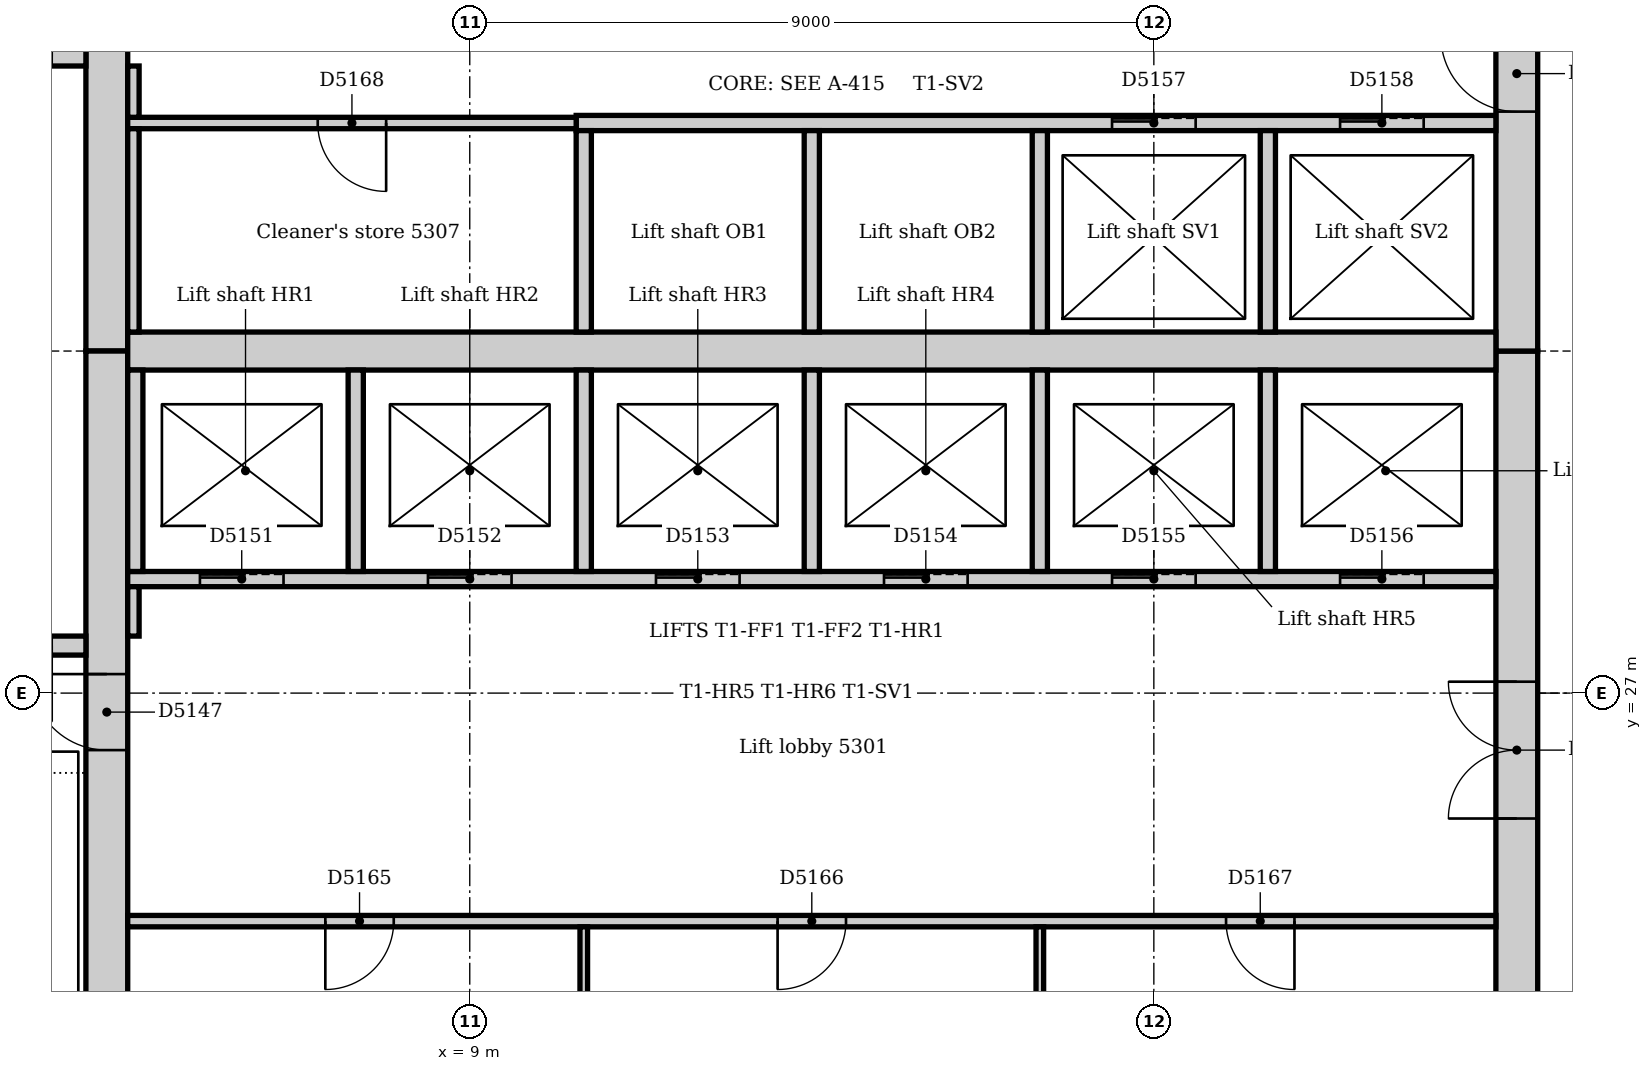
"""IFC4 building model, lengths in metres.
Left out: names, types, materials, properties, quantities, classifications, styles, units other than length and angle.
Written with IfcOpenShell. Run it as: python <this file> out.ifc"""

import sys

from ifc_helpers import new_model, si_unit, direction, frame, frame_2d, origin, place, context, subcontext, project, spatial, rectangle, extrude, element, fill, save


model = new_model("IFC4")
c1 = context("Model", 3, precision=1e-05, world=origin(), true_north=direction((0.0, 1.0)))
c2 = subcontext(c1, "Body", "Model", "MODEL_VIEW")
j1 = project(units=[si_unit("LENGTHUNIT", "METRE"), si_unit("PLANEANGLEUNIT", "RADIAN")], contexts=[c1])
p1 = place(None, origin())
s1 = spatial("IfcSite", under=j1, at=p1, CompositionType="ELEMENT")
p2 = place(p1, origin())
s2 = spatial("IfcBuilding", under=s1, at=p2, CompositionType="ELEMENT")
p3 = place(p2, frame((0.0, 0.0, 222.0)))
s3 = spatial("IfcBuildingStorey", under=s2, at=p3, CompositionType="ELEMENT", Elevation=222.0)
p4 = place(p3, frame((22.775, 21.0, 0.0), z_axis=(0.0, 0.0, 1.0), x_axis=(0.0, 1.0, 0.0)))
e1 = element("IfcWall", 1, at=p4, inside=s3, PredefinedType="SOLIDWALL", context=c2, shape_type="SweptSolid", body=[
    extrude(rectangle(XDim=10.5, YDim=0.55, at=frame_2d((5.25, 0.0))), origin(), (0.0, 0.0, 1.0), 4.0),
])
p5 = place(p4, frame((4.35, 0.0, 0.0)))
e2 = element("IfcOpeningElement", 2, at=p5, cuts=e1, PredefinedType="OPENING", context=c2, shape_type="SweptSolid", body=[
    extrude(rectangle(XDim=1.8, YDim=2.1, at=frame_2d((0.9, 1.05))), frame((0.0, 0.285, 0.0), z_axis=(0.0, -1.0, 0.0), x_axis=(1.0, 0.0, 0.0)), (0.0, 0.0, 1.0), 0.57),
])
p6 = place(p3, frame((22.775, 31.5, 0.0), z_axis=(0.0, 0.0, 1.0), x_axis=(0.0, 1.0, 0.0)))
e3 = element("IfcWall", 3, at=p6, inside=s3, PredefinedType="SOLIDWALL", context=c2, shape_type="SweptSolid", body=[
    extrude(rectangle(XDim=10.5, YDim=0.55, at=frame_2d((5.25, 0.0))), origin(), (0.0, 0.0, 1.0), 4.0),
])
p7 = place(p6, frame((3.15, 0.0, 0.0)))
e4 = element("IfcOpeningElement", 4, at=p7, cuts=e3, PredefinedType="OPENING", context=c2, shape_type="SweptSolid", body=[
    extrude(rectangle(XDim=1.0, YDim=2.1, at=frame_2d((0.5, 1.05))), frame((0.0, 0.285, 0.0), z_axis=(0.0, -1.0, 0.0), x_axis=(1.0, 0.0, 0.0)), (0.0, 0.0, 1.0), 0.57),
])
p8 = place(p6, frame((5.2, 0.0, 0.0)))
e5 = element("IfcOpeningElement", 5, at=p8, cuts=e3, PredefinedType="OPENING", context=c2, shape_type="SweptSolid", body=[
    extrude(rectangle(XDim=1.0, YDim=2.1, at=frame_2d((0.5, 1.05))), frame((0.0, 0.285, 0.0), z_axis=(0.0, -1.0, 0.0), x_axis=(1.0, 0.0, 0.0)), (0.0, 0.0, 1.0), 0.57),
])
p9 = place(p3, frame((4.225, 42.0, 0.0), z_axis=(0.0, 0.0, 1.0), x_axis=(0.0, -1.0, 0.0)))
e6 = element("IfcWall", 6, at=p9, inside=s3, PredefinedType="SOLIDWALL", context=c2, shape_type="SweptSolid", body=[
    extrude(rectangle(XDim=10.5, YDim=0.55, at=frame_2d((5.25, 0.0))), origin(), (0.0, 0.0, 1.0), 4.0),
])
p10 = place(p9, frame((5.3, 0.0, 0.0)))
e7 = element("IfcOpeningElement", 7, at=p10, cuts=e6, PredefinedType="OPENING", context=c2, shape_type="SweptSolid", body=[
    extrude(rectangle(XDim=1.0, YDim=2.1, at=frame_2d((0.5, 1.05))), frame((0.0, 0.285, 0.0), z_axis=(0.0, -1.0, 0.0), x_axis=(1.0, 0.0, 0.0)), (0.0, 0.0, 1.0), 0.57),
])
p11 = place(p3, frame((4.225, 31.5, 0.0), z_axis=(0.0, 0.0, 1.0), x_axis=(0.0, -1.0, 0.0)))
e8 = element("IfcWall", 8, at=p11, inside=s3, PredefinedType="SOLIDWALL", context=c2, shape_type="SweptSolid", body=[
    extrude(rectangle(XDim=10.5, YDim=0.55, at=frame_2d((5.25, 0.0))), origin(), (0.0, 0.0, 1.0), 4.0),
])
p12 = place(p11, frame((4.25, 0.0, 0.0)))
e9 = element("IfcOpeningElement", 9, at=p12, cuts=e8, PredefinedType="OPENING", context=c2, shape_type="SweptSolid", body=[
    extrude(rectangle(XDim=1.0, YDim=2.1, at=frame_2d((0.5, 1.05))), frame((0.0, 0.285, 0.0), z_axis=(0.0, -1.0, 0.0), x_axis=(1.0, 0.0, 0.0)), (0.0, 0.0, 1.0), 0.57),
])
p13 = place(p3, frame((4.5, 31.5, 0.0), z_axis=(0.0, 0.0, 1.0), x_axis=(1.0, 0.0, 0.0)))
e10 = element("IfcWall", 10, at=p13, inside=s3, PredefinedType="SOLIDWALL", context=c2, shape_type="SweptSolid", body=[
    extrude(rectangle(XDim=18.0, YDim=0.5, at=frame_2d((9.0, 0.0))), origin(), (0.0, 0.0, 1.0), 4.0),
])
p14 = place(p3, frame((3.95, 27.625, 0.0), z_axis=(0.0, 0.0, 1.0), x_axis=(-1.0, 0.0, 0.0)))
e11 = element("IfcWall", 11, at=p14, inside=s3, PredefinedType="SOLIDWALL", context=c2, shape_type="SweptSolid", body=[
    extrude(rectangle(XDim=3.59, YDim=0.25, at=frame_2d((1.795, 0.0))), origin(), (0.0, 0.0, 1.0), 4.0),
])
p15 = place(p14, frame((0.45, 0.0, 0.0)))
e12 = element("IfcOpeningElement", 12, at=p15, cuts=e11, PredefinedType="OPENING", context=c2, shape_type="SweptSolid", body=[
    extrude(rectangle(XDim=1.0, YDim=2.1, at=frame_2d((0.5, 1.05))), frame((0.0, 0.135, 0.0), z_axis=(0.0, -1.0, 0.0), x_axis=(1.0, 0.0, 0.0)), (0.0, 0.0, 1.0), 0.27),
])
p16 = place(p3, frame((0.36, 35.375, 0.0), z_axis=(0.0, 0.0, 1.0), x_axis=(1.0, 0.0, 0.0)))
e13 = element("IfcWall", 13, at=p16, inside=s3, PredefinedType="SOLIDWALL", context=c2, shape_type="SweptSolid", body=[
    extrude(rectangle(XDim=3.59, YDim=0.25, at=frame_2d((1.795, 0.0))), origin(), (0.0, 0.0, 1.0), 4.0),
])
p17 = place(p16, frame((2.14, 0.0, 0.0)))
e14 = element("IfcOpeningElement", 14, at=p17, cuts=e13, PredefinedType="OPENING", context=c2, shape_type="SweptSolid", body=[
    extrude(rectangle(XDim=1.0, YDim=2.1, at=frame_2d((0.5, 1.05))), frame((0.0, 0.135, 0.0), z_axis=(0.0, -1.0, 0.0), x_axis=(1.0, 0.0, 0.0)), (0.0, 0.0, 1.0), 0.27),
])
p18 = place(p3, frame((4.5, 28.5, 0.0), z_axis=(0.0, 0.0, 1.0), x_axis=(1.0, 0.0, 0.0)))
e15 = element("IfcWall", 15, at=p18, inside=s3, PredefinedType="PARTITIONING", context=c2, shape_type="SweptSolid", body=[
    extrude(rectangle(XDim=18.0, YDim=0.2, at=frame_2d((9.0, 0.0))), origin(), (0.0, 0.0, 1.0), 3.85),
])
p19 = place(p18, frame((0.95, 0.0, 0.0)))
e16 = element("IfcOpeningElement", 16, at=p19, cuts=e15, PredefinedType="OPENING", context=c2, shape_type="SweptSolid", body=[
    extrude(rectangle(XDim=1.1, YDim=2.1, at=frame_2d((0.55, 1.05))), frame((0.0, 0.11, 0.0), z_axis=(0.0, -1.0, 0.0), x_axis=(1.0, 0.0, 0.0)), (0.0, 0.0, 1.0), 0.22),
])
p20 = place(p18, frame((3.95, 0.0, 0.0)))
e17 = element("IfcOpeningElement", 17, at=p20, cuts=e15, PredefinedType="OPENING", context=c2, shape_type="SweptSolid", body=[
    extrude(rectangle(XDim=1.1, YDim=2.1, at=frame_2d((0.55, 1.05))), frame((0.0, 0.11, 0.0), z_axis=(0.0, -1.0, 0.0), x_axis=(1.0, 0.0, 0.0)), (0.0, 0.0, 1.0), 0.22),
])
p21 = place(p18, frame((6.95, 0.0, 0.0)))
e18 = element("IfcOpeningElement", 18, at=p21, cuts=e15, PredefinedType="OPENING", context=c2, shape_type="SweptSolid", body=[
    extrude(rectangle(XDim=1.1, YDim=2.1, at=frame_2d((0.55, 1.05))), frame((0.0, 0.11, 0.0), z_axis=(0.0, -1.0, 0.0), x_axis=(1.0, 0.0, 0.0)), (0.0, 0.0, 1.0), 0.22),
])
p22 = place(p18, frame((9.95, 0.0, 0.0)))
e19 = element("IfcOpeningElement", 19, at=p22, cuts=e15, PredefinedType="OPENING", context=c2, shape_type="SweptSolid", body=[
    extrude(rectangle(XDim=1.1, YDim=2.1, at=frame_2d((0.55, 1.05))), frame((0.0, 0.11, 0.0), z_axis=(0.0, -1.0, 0.0), x_axis=(1.0, 0.0, 0.0)), (0.0, 0.0, 1.0), 0.22),
])
p23 = place(p18, frame((12.95, 0.0, 0.0)))
e20 = element("IfcOpeningElement", 20, at=p23, cuts=e15, PredefinedType="OPENING", context=c2, shape_type="SweptSolid", body=[
    extrude(rectangle(XDim=1.1, YDim=2.1, at=frame_2d((0.55, 1.05))), frame((0.0, 0.11, 0.0), z_axis=(0.0, -1.0, 0.0), x_axis=(1.0, 0.0, 0.0)), (0.0, 0.0, 1.0), 0.22),
])
p24 = place(p18, frame((15.95, 0.0, 0.0)))
e21 = element("IfcOpeningElement", 21, at=p24, cuts=e15, PredefinedType="OPENING", context=c2, shape_type="SweptSolid", body=[
    extrude(rectangle(XDim=1.1, YDim=2.1, at=frame_2d((0.55, 1.05))), frame((0.0, 0.11, 0.0), z_axis=(0.0, -1.0, 0.0), x_axis=(1.0, 0.0, 0.0)), (0.0, 0.0, 1.0), 0.22),
])
p25 = place(p3, frame((10.4, 34.5, 0.0), z_axis=(0.0, 0.0, 1.0), x_axis=(1.0, 0.0, 0.0)))
e22 = element("IfcWall", 22, at=p25, inside=s3, PredefinedType="PARTITIONING", context=c2, shape_type="SweptSolid", body=[
    extrude(rectangle(XDim=12.1, YDim=0.2, at=frame_2d((6.05, 0.0))), origin(), (0.0, 0.0, 1.0), 3.85),
])
p26 = place(p25, frame((7.05, 0.0, 0.0)))
e23 = element("IfcOpeningElement", 23, at=p26, cuts=e22, PredefinedType="OPENING", context=c2, shape_type="SweptSolid", body=[
    extrude(rectangle(XDim=1.1, YDim=2.1, at=frame_2d((0.55, 1.05))), frame((0.0, 0.11, 0.0), z_axis=(0.0, -1.0, 0.0), x_axis=(1.0, 0.0, 0.0)), (0.0, 0.0, 1.0), 0.22),
])
p27 = place(p25, frame((10.05, 0.0, 0.0)))
e24 = element("IfcOpeningElement", 24, at=p27, cuts=e22, PredefinedType="OPENING", context=c2, shape_type="SweptSolid", body=[
    extrude(rectangle(XDim=1.1, YDim=2.1, at=frame_2d((0.55, 1.05))), frame((0.0, 0.11, 0.0), z_axis=(0.0, -1.0, 0.0), x_axis=(1.0, 0.0, 0.0)), (0.0, 0.0, 1.0), 0.22),
])
for number, where, z_axis, x_axis in (
    (25, (10.5, 28.6, 0.0), (0.0, 0.0, 1.0), (0.0, 1.0, 0.0)),
    (26, (10.5, 31.75, 0.0), (0.0, 0.0, 1.0), (0.0, 1.0, 0.0)),
    (27, (13.5, 28.6, 0.0), (0.0, 0.0, 1.0), (0.0, 1.0, 0.0)),
    (28, (13.5, 31.75, 0.0), (0.0, 0.0, 1.0), (0.0, 1.0, 0.0)),
    (29, (16.5, 28.6, 0.0), (0.0, 0.0, 1.0), (0.0, 1.0, 0.0)),
    (30, (16.5, 31.75, 0.0), (0.0, 0.0, 1.0), (0.0, 1.0, 0.0)),
    (31, (19.5, 28.6, 0.0), (0.0, 0.0, 1.0), (0.0, 1.0, 0.0)),
    (32, (19.5, 31.75, 0.0), (0.0, 0.0, 1.0), (0.0, 1.0, 0.0)),
    (33, (4.6, 28.6, 0.0), (0.0, 0.0, 1.0), (0.0, 1.0, 0.0)),
    (34, (7.5, 28.6, 0.0), (0.0, 0.0, 1.0), (0.0, 1.0, 0.0)),
):
    element("IfcWall", number, at=place(p3, frame(where, z_axis=z_axis, x_axis=x_axis)), inside=s3, PredefinedType="PARTITIONING", context=c2, shape_type="SweptSolid", body=[
        extrude(rectangle(XDim=2.65, YDim=0.2, at=frame_2d((1.325, 0.0))), origin(), (0.0, 0.0, 1.0), 3.85),
    ])
p28 = place(p3, frame((4.5, 24.0, 0.0), z_axis=(0.0, 0.0, 1.0), x_axis=(1.0, 0.0, 0.0)))
e35 = element("IfcWall", 35, at=p28, inside=s3, PredefinedType="PARTITIONING", context=c2, shape_type="SweptSolid", body=[
    extrude(rectangle(XDim=18.0, YDim=0.15, at=frame_2d((9.0, 0.0))), origin(), (0.0, 0.0, 1.0), 3.85),
])
p29 = place(p28, frame((2.6, 0.0, 0.0)))
e36 = element("IfcOpeningElement", 36, at=p29, cuts=e35, PredefinedType="OPENING", context=c2, shape_type="SweptSolid", body=[
    extrude(rectangle(XDim=0.9, YDim=2.1, at=frame_2d((0.45, 1.05))), frame((0.0, 0.085, 0.0), z_axis=(0.0, -1.0, 0.0), x_axis=(1.0, 0.0, 0.0)), (0.0, 0.0, 1.0), 0.17),
])
p30 = place(p28, frame((8.55, 0.0, 0.0)))
e37 = element("IfcOpeningElement", 37, at=p30, cuts=e35, PredefinedType="OPENING", context=c2, shape_type="SweptSolid", body=[
    extrude(rectangle(XDim=0.9, YDim=2.1, at=frame_2d((0.45, 1.05))), frame((0.0, 0.085, 0.0), z_axis=(0.0, -1.0, 0.0), x_axis=(1.0, 0.0, 0.0)), (0.0, 0.0, 1.0), 0.17),
])
p31 = place(p28, frame((14.45, 0.0, 0.0)))
e38 = element("IfcOpeningElement", 38, at=p31, cuts=e35, PredefinedType="OPENING", context=c2, shape_type="SweptSolid", body=[
    extrude(rectangle(XDim=0.9, YDim=2.1, at=frame_2d((0.45, 1.05))), frame((0.0, 0.085, 0.0), z_axis=(0.0, -1.0, 0.0), x_axis=(1.0, 0.0, 0.0)), (0.0, 0.0, 1.0), 0.17),
])
p32 = place(p3, frame((4.5, 34.5, 0.0), z_axis=(0.0, 0.0, 1.0), x_axis=(1.0, 0.0, 0.0)))
e39 = element("IfcWall", 39, at=p32, inside=s3, PredefinedType="PARTITIONING", context=c2, shape_type="SweptSolid", body=[
    extrude(rectangle(XDim=5.9, YDim=0.15, at=frame_2d((2.95, 0.0))), origin(), (0.0, 0.0, 1.0), 3.85),
])
p33 = place(p32, frame((2.5, 0.0, 0.0)))
e40 = element("IfcOpeningElement", 40, at=p33, cuts=e39, PredefinedType="OPENING", context=c2, shape_type="SweptSolid", body=[
    extrude(rectangle(XDim=0.9, YDim=2.1, at=frame_2d((0.45, 1.05))), frame((0.0, 0.085, 0.0), z_axis=(0.0, -1.0, 0.0), x_axis=(1.0, 0.0, 0.0)), (0.0, 0.0, 1.0), 0.17),
])
p34 = place(p3, frame((4.575, 34.575, 0.0), z_axis=(0.0, 0.0, 1.0), x_axis=(0.0, 1.0, 0.0)))
e41 = element("IfcWall", 41, at=p34, inside=s3, PredefinedType="PARTITIONING", context=c2, shape_type="SweptSolid", body=[
    extrude(rectangle(XDim=0.675, YDim=0.15, at=frame_2d((0.338, 0.0))), origin(), (0.0, 0.0, 1.0), 3.85),
])
p35 = place(p3, frame((4.575, 31.75, 0.0), z_axis=(0.0, 0.0, 1.0), x_axis=(0.0, 1.0, 0.0)))
e42 = element("IfcWall", 42, at=p35, inside=s3, PredefinedType="PARTITIONING", context=c2, shape_type="SweptSolid", body=[
    extrude(rectangle(XDim=2.675, YDim=0.15, at=frame_2d((1.337, 0.0))), origin(), (0.0, 0.0, 1.0), 3.85),
])
p36 = place(p3, frame((4.575, 27.75, 0.0), z_axis=(0.0, 0.0, 1.0), x_axis=(0.0, 1.0, 0.0)))
e43 = element("IfcWall", 43, at=p36, inside=s3, PredefinedType="PARTITIONING", context=c2, shape_type="SweptSolid", body=[
    extrude(rectangle(XDim=0.65, YDim=0.15, at=frame_2d((0.325, 0.0))), origin(), (0.0, 0.0, 1.0), 3.85),
])
for number, where, z_axis, x_axis in (
    (44, (10.5, 21.0, 0.0), (0.0, 0.0, 1.0), (0.0, 1.0, 0.0)),
    (45, (16.5, 21.0, 0.0), (0.0, 0.0, 1.0), (0.0, 1.0, 0.0)),
):
    element("IfcWall", number, at=place(p3, frame(where, z_axis=z_axis, x_axis=x_axis)), inside=s3, PredefinedType="PARTITIONING", context=c2, shape_type="SweptSolid", body=[
        extrude(rectangle(XDim=2.925, YDim=0.1, at=frame_2d((1.462, 0.0))), origin(), (0.0, 0.0, 1.0), 3.85),
    ])
p37 = place(p12, frame((1.0, 0.0, 0.0), z_axis=(0.0, 0.0, 1.0), x_axis=(-1.0, 0.0, 0.0)))
e46 = element("IfcDoor", 46, at=p37, inside=s3, OperationType="SINGLE_SWING_RIGHT", PredefinedType="DOOR", context=c2, shape_type="SweptSolid", body=[
    extrude(rectangle(XDim=1.0, YDim=2.1, at=frame_2d((0.5, 1.05))), frame((0.0, 0.025, 0.0), z_axis=(0.0, -1.0, 0.0), x_axis=(1.0, 0.0, 0.0)), (0.0, 0.0, 1.0), 0.05),
])
fill(e9, e46)
p38 = place(p19, origin())
e47 = element("IfcDoor", 47, at=p38, inside=s3, OperationType="SLIDING_TO_LEFT", PredefinedType="DOOR", context=c2, shape_type="SweptSolid", body=[
    extrude(rectangle(XDim=1.1, YDim=2.1, at=frame_2d((0.55, 1.05))), frame((0.0, 0.025, 0.0), z_axis=(0.0, -1.0, 0.0), x_axis=(1.0, 0.0, 0.0)), (0.0, 0.0, 1.0), 0.05),
])
fill(e16, e47)
p39 = place(p20, origin())
e48 = element("IfcDoor", 48, at=p39, inside=s3, OperationType="SLIDING_TO_LEFT", PredefinedType="DOOR", context=c2, shape_type="SweptSolid", body=[
    extrude(rectangle(XDim=1.1, YDim=2.1, at=frame_2d((0.55, 1.05))), frame((0.0, 0.025, 0.0), z_axis=(0.0, -1.0, 0.0), x_axis=(1.0, 0.0, 0.0)), (0.0, 0.0, 1.0), 0.05),
])
fill(e17, e48)
p40 = place(p21, origin())
e49 = element("IfcDoor", 49, at=p40, inside=s3, OperationType="SLIDING_TO_LEFT", PredefinedType="DOOR", context=c2, shape_type="SweptSolid", body=[
    extrude(rectangle(XDim=1.1, YDim=2.1, at=frame_2d((0.55, 1.05))), frame((0.0, 0.025, 0.0), z_axis=(0.0, -1.0, 0.0), x_axis=(1.0, 0.0, 0.0)), (0.0, 0.0, 1.0), 0.05),
])
fill(e18, e49)
p41 = place(p22, origin())
e50 = element("IfcDoor", 50, at=p41, inside=s3, OperationType="SLIDING_TO_LEFT", PredefinedType="DOOR", context=c2, shape_type="SweptSolid", body=[
    extrude(rectangle(XDim=1.1, YDim=2.1, at=frame_2d((0.55, 1.05))), frame((0.0, 0.025, 0.0), z_axis=(0.0, -1.0, 0.0), x_axis=(1.0, 0.0, 0.0)), (0.0, 0.0, 1.0), 0.05),
])
fill(e19, e50)
p42 = place(p23, origin())
e51 = element("IfcDoor", 51, at=p42, inside=s3, OperationType="SLIDING_TO_LEFT", PredefinedType="DOOR", context=c2, shape_type="SweptSolid", body=[
    extrude(rectangle(XDim=1.1, YDim=2.1, at=frame_2d((0.55, 1.05))), frame((0.0, 0.025, 0.0), z_axis=(0.0, -1.0, 0.0), x_axis=(1.0, 0.0, 0.0)), (0.0, 0.0, 1.0), 0.05),
])
fill(e20, e51)
p43 = place(p24, origin())
e52 = element("IfcDoor", 52, at=p43, inside=s3, OperationType="SLIDING_TO_LEFT", PredefinedType="DOOR", context=c2, shape_type="SweptSolid", body=[
    extrude(rectangle(XDim=1.1, YDim=2.1, at=frame_2d((0.55, 1.05))), frame((0.0, 0.025, 0.0), z_axis=(0.0, -1.0, 0.0), x_axis=(1.0, 0.0, 0.0)), (0.0, 0.0, 1.0), 0.05),
])
fill(e21, e52)
p44 = place(p26, origin())
e53 = element("IfcDoor", 53, at=p44, inside=s3, OperationType="SLIDING_TO_LEFT", PredefinedType="DOOR", context=c2, shape_type="SweptSolid", body=[
    extrude(rectangle(XDim=1.1, YDim=2.1, at=frame_2d((0.55, 1.05))), frame((0.0, 0.025, 0.0), z_axis=(0.0, -1.0, 0.0), x_axis=(1.0, 0.0, 0.0)), (0.0, 0.0, 1.0), 0.05),
])
fill(e23, e53)
p45 = place(p27, origin())
e54 = element("IfcDoor", 54, at=p45, inside=s3, OperationType="SLIDING_TO_LEFT", PredefinedType="DOOR", context=c2, shape_type="SweptSolid", body=[
    extrude(rectangle(XDim=1.1, YDim=2.1, at=frame_2d((0.55, 1.05))), frame((0.0, 0.025, 0.0), z_axis=(0.0, -1.0, 0.0), x_axis=(1.0, 0.0, 0.0)), (0.0, 0.0, 1.0), 0.05),
])
fill(e24, e54)
p46 = place(p5, origin())
e55 = element("IfcDoor", 55, at=p46, inside=s3, OperationType="DOUBLE_DOOR_DOUBLE_SWING", PredefinedType="DOOR", context=c2, shape_type="SweptSolid", body=[
    extrude(rectangle(XDim=1.8, YDim=2.1, at=frame_2d((0.9, 1.05))), frame((0.0, 0.025, 0.0), z_axis=(0.0, -1.0, 0.0), x_axis=(1.0, 0.0, 0.0)), (0.0, 0.0, 1.0), 0.05),
])
fill(e2, e55)
p47 = place(p7, origin())
e56 = element("IfcDoor", 56, at=p47, inside=s3, OperationType="SINGLE_SWING_RIGHT", PredefinedType="DOOR", context=c2, shape_type="SweptSolid", body=[
    extrude(rectangle(XDim=1.0, YDim=2.1, at=frame_2d((0.5, 1.05))), frame((0.0, 0.025, 0.0), z_axis=(0.0, -1.0, 0.0), x_axis=(1.0, 0.0, 0.0)), (0.0, 0.0, 1.0), 0.05),
])
fill(e4, e56)
p48 = place(p29, frame((0.9, 0.0, 0.0), z_axis=(0.0, 0.0, 1.0), x_axis=(-1.0, 0.0, 0.0)))
e57 = element("IfcDoor", 57, at=p48, inside=s3, OperationType="SINGLE_SWING_RIGHT", PredefinedType="DOOR", context=c2, shape_type="SweptSolid", body=[
    extrude(rectangle(XDim=0.9, YDim=2.1, at=frame_2d((0.45, 1.05))), frame((0.0, 0.025, 0.0), z_axis=(0.0, -1.0, 0.0), x_axis=(1.0, 0.0, 0.0)), (0.0, 0.0, 1.0), 0.05),
])
fill(e36, e57)
p49 = place(p30, frame((0.9, 0.0, 0.0), z_axis=(0.0, 0.0, 1.0), x_axis=(-1.0, 0.0, 0.0)))
e58 = element("IfcDoor", 58, at=p49, inside=s3, OperationType="SINGLE_SWING_RIGHT", PredefinedType="DOOR", context=c2, shape_type="SweptSolid", body=[
    extrude(rectangle(XDim=0.9, YDim=2.1, at=frame_2d((0.45, 1.05))), frame((0.0, 0.025, 0.0), z_axis=(0.0, -1.0, 0.0), x_axis=(1.0, 0.0, 0.0)), (0.0, 0.0, 1.0), 0.05),
])
fill(e37, e58)
p50 = place(p31, frame((0.9, 0.0, 0.0), z_axis=(0.0, 0.0, 1.0), x_axis=(-1.0, 0.0, 0.0)))
e59 = element("IfcDoor", 59, at=p50, inside=s3, OperationType="SINGLE_SWING_LEFT", PredefinedType="DOOR", context=c2, shape_type="SweptSolid", body=[
    extrude(rectangle(XDim=0.9, YDim=2.1, at=frame_2d((0.45, 1.05))), frame((0.0, 0.025, 0.0), z_axis=(0.0, -1.0, 0.0), x_axis=(1.0, 0.0, 0.0)), (0.0, 0.0, 1.0), 0.05),
])
fill(e38, e59)
p51 = place(p33, frame((0.9, 0.0, 0.0), z_axis=(0.0, 0.0, 1.0), x_axis=(-1.0, 0.0, 0.0)))
e60 = element("IfcDoor", 60, at=p51, inside=s3, OperationType="SINGLE_SWING_LEFT", PredefinedType="DOOR", context=c2, shape_type="SweptSolid", body=[
    extrude(rectangle(XDim=0.9, YDim=2.1, at=frame_2d((0.45, 1.05))), frame((0.0, 0.025, 0.0), z_axis=(0.0, -1.0, 0.0), x_axis=(1.0, 0.0, 0.0)), (0.0, 0.0, 1.0), 0.05),
])
fill(e40, e60)
save(model, sys.argv[1])
